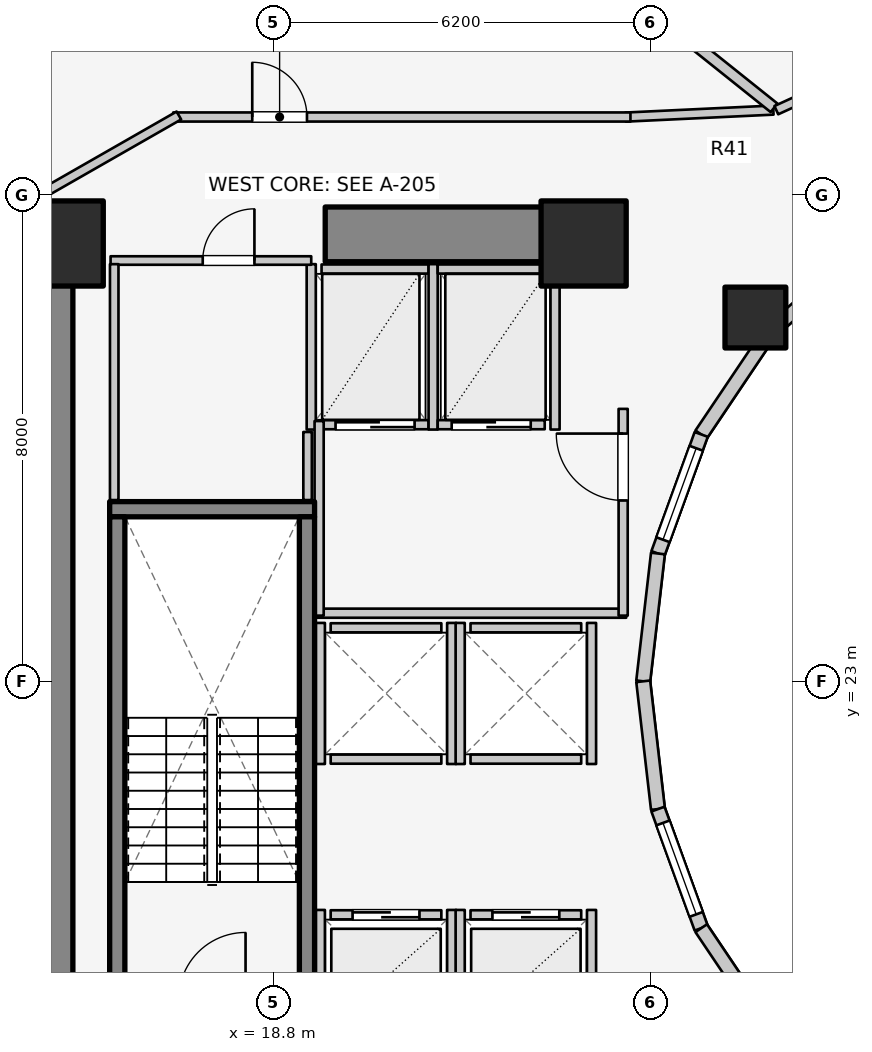
"""IFC4 building model, lengths in metres.
Left out: names, types, materials, properties, quantities, classifications, styles, units other than length and angle.
Written with IfcOpenShell. Run it as: python <this file> out.ifc"""

import sys

from ifc_helpers import new_model, si_unit, direction, frame, frame_2d, origin, origin_2d, place, context, subcontext, project, spatial, rectangle, extrude, element, fill, save


model = new_model("IFC4")
c1 = context("Model", 3, precision=1e-05, world=origin(), true_north=direction((0.0, 1.0)))
c2 = subcontext(c1, "Body", "Model", "MODEL_VIEW")
j1 = project(units=[si_unit("LENGTHUNIT", "METRE"), si_unit("PLANEANGLEUNIT", "RADIAN")], contexts=[c1])
p1 = place(None, origin())
s1 = spatial("IfcSite", under=j1, at=p1, CompositionType="ELEMENT")
p2 = place(p1, origin())
s2 = spatial("IfcBuilding", under=s1, at=p2, CompositionType="ELEMENT")
p3 = place(p2, frame((0.0, 0.0, 30.7)))
s3 = spatial("IfcBuildingStorey", under=s2, at=p3, CompositionType="ELEMENT", Elevation=30.7)
p4 = place(p3, frame((15.05, 17.05, 0.0), z_axis=(0.0, 0.0, 1.0), x_axis=(0.0, 1.0, 0.0)))
e1 = element("IfcWall", 1, at=p4, inside=s3, PredefinedType="SHEAR", context=c2, shape_type="SweptSolid", body=[
    extrude(rectangle(XDim=12.8, YDim=0.9, at=frame_2d((6.4, 0.0))), origin(), (0.0, 0.0, 1.0), 3.1),
])
p5 = place(p3, frame((19.65, 30.35, 0.0), z_axis=(0.0, 0.0, 1.0), x_axis=(1.0, 0.0, 0.0)))
e2 = element("IfcWall", 2, at=p5, inside=s3, PredefinedType="SHEAR", context=c2, shape_type="SweptSolid", body=[
    extrude(rectangle(XDim=4.5, YDim=0.9, at=frame_2d((2.25, 0.0))), origin(), (0.0, 0.0, 1.0), 3.1),
])
p6 = place(p3, frame((16.105, 25.83, 0.0), z_axis=(0.0, 0.0, 1.0), x_axis=(1.0, 0.0, 0.0)))
e3 = element("IfcWall", 3, at=p6, inside=s3, PredefinedType="SOLIDWALL", context=c2, shape_type="SweptSolid", body=[
    extrude(rectangle(XDim=3.37, YDim=0.25, at=frame_2d((1.685, 0.0))), origin(), (0.0, 0.0, 1.0), 3.1),
])
for number, where, z_axis, x_axis in (
    (4, (16.23, 17.895, 0.0), (0.0, 0.0, 1.0), (0.0, 1.0, 0.0)),
    (5, (19.35, 17.895, 0.0), (0.0, 0.0, 1.0), (0.0, 1.0, 0.0)),
):
    element("IfcWall", number, at=place(p3, frame(where, z_axis=z_axis, x_axis=x_axis)), inside=s3, PredefinedType="SOLIDWALL", context=c2, shape_type="SweptSolid", body=[
        extrude(rectangle(XDim=7.81, YDim=0.25, at=frame_2d((3.905, 0.0))), origin(), (0.0, 0.0, 1.0), 3.1),
    ])
for number, where, z_axis, x_axis in (
    (6, (23.9, 30.2, 0.0), (0.0, 0.0, 1.0), (1.0, 0.0, 0.0)),
    (7, (15.3, 30.2, 0.0), (0.0, 0.0, 1.0), (1.0, 0.0, 0.0)),
):
    element("IfcColumn", number, at=place(p3, frame(where, z_axis=z_axis, x_axis=x_axis)), inside=s3, PredefinedType="COLUMN", context=c2, shape_type="SweptSolid", body=[
        extrude(rectangle(XDim=1.4, YDim=1.4, at=origin_2d()), origin(), (0.0, 0.0, 1.0), 3.1),
    ])
p7 = place(p3, frame((26.725, 28.982, 0.0), z_axis=(0.0, 0.0, 1.0), x_axis=(1.0, 0.0, 0.0)))
e8 = element("IfcColumn", 8, at=p7, inside=s3, PredefinedType="COLUMN", context=c2, shape_type="SweptSolid", body=[
    extrude(rectangle(XDim=1.0, YDim=1.0, at=origin_2d()), origin(), (0.0, 0.0, 1.0), 3.1),
])
p8 = place(p3, frame((28.44, 30.032, 0.0), z_axis=(0.0, 0.0, 1.0), x_axis=(-0.752576694707, -0.658504607869, 0.0)))
e9 = element("IfcWall", 9, at=p8, inside=s3, PredefinedType="STANDARD", context=c2, shape_type="SweptSolid", body=[
    extrude(rectangle(XDim=1.959, YDim=0.23, at=frame_2d((0.98, 0.0))), origin(), (0.0, 0.0, 1.0), 2.16),
])
p9 = place(p3, frame((26.965, 28.742, 0.0), z_axis=(0.0, 0.0, 1.0), x_axis=(-0.558197800898, -0.829707909492, 0.0)))
e10 = element("IfcWall", 10, at=p9, inside=s3, PredefinedType="STANDARD", context=c2, shape_type="SweptSolid", body=[
    extrude(rectangle(XDim=2.027, YDim=0.23, at=frame_2d((1.013, 0.0))), origin(), (0.0, 0.0, 1.0), 2.16),
])
p10 = place(p3, frame((25.834, 27.06, 0.0), z_axis=(0.0, 0.0, 1.0), x_axis=(-0.341423187295, -0.93990968033, 0.0)))
e11 = element("IfcWall", 11, at=p10, inside=s3, PredefinedType="STANDARD", context=c2, shape_type="SweptSolid", body=[
    extrude(rectangle(XDim=2.084, YDim=0.23, at=frame_2d((1.042, 0.0))), origin(), (0.0, 0.0, 1.0), 2.84),
])
p11 = place(p10, frame((0.242, 0.0, 0.85)))
e12 = element("IfcOpeningElement", 12, at=p11, cuts=e11, PredefinedType="OPENING", context=c2, shape_type="SweptSolid", body=[
    extrude(rectangle(XDim=1.6, YDim=1.65, at=frame_2d((0.8, 0.825))), frame((0.0, 0.125, 0.0), z_axis=(0.0, -1.0, 0.0), x_axis=(1.0, 0.0, 0.0)), (0.0, 0.0, 1.0), 0.25),
])
for number, where, z_axis, x_axis in (
    (13, (25.123, 25.102, 0.0), (0.0, 0.0, 1.0), (-0.115, -0.993, 0.0)),
    (14, (24.88, 23.0, 0.0), (0.0, 0.0, 1.0), (0.115, -0.993, 0.0)),
):
    element("IfcWall", number, at=place(p3, frame(where, z_axis=z_axis, x_axis=x_axis)), inside=s3, PredefinedType="STANDARD", context=c2, shape_type="SweptSolid", body=[
        extrude(rectangle(XDim=2.115, YDim=0.23, at=frame_2d((1.058, 0.0))), origin(), (0.0, 0.0, 1.0), 2.84),
    ])
p12 = place(p3, frame((25.123, 20.898, 0.0), z_axis=(0.0, 0.0, 1.0), x_axis=(0.341423187295, -0.93990968033, 0.0)))
e15 = element("IfcWall", 15, at=p12, inside=s3, PredefinedType="STANDARD", context=c2, shape_type="SweptSolid", body=[
    extrude(rectangle(XDim=2.084, YDim=0.23, at=frame_2d((1.042, 0.0))), origin(), (0.0, 0.0, 1.0), 2.84),
])
p13 = place(p12, frame((0.242, 0.0, 0.85)))
e16 = element("IfcOpeningElement", 16, at=p13, cuts=e15, PredefinedType="OPENING", context=c2, shape_type="SweptSolid", body=[
    extrude(rectangle(XDim=1.6, YDim=1.65, at=frame_2d((0.8, 0.825))), frame((0.0, 0.125, 0.0), z_axis=(0.0, -1.0, 0.0), x_axis=(1.0, 0.0, 0.0)), (0.0, 0.0, 1.0), 0.25),
])
p14 = place(p3, frame((25.834, 18.94, 0.0), z_axis=(0.0, 0.0, 1.0), x_axis=(0.558197800898, -0.829707909492, 0.0)))
e17 = element("IfcWall", 17, at=p14, inside=s3, PredefinedType="STANDARD", context=c2, shape_type="SweptSolid", body=[
    extrude(rectangle(XDim=2.027, YDim=0.23, at=frame_2d((1.013, 0.0))), origin(), (0.0, 0.0, 1.0), 2.16),
])
p15 = place(p3, frame((19.74, 19.16, 0.0), z_axis=(0.0, 0.0, 1.0), x_axis=(1.0, 0.0, 0.0)))
e18 = element("IfcWall", 18, at=p15, inside=s3, PredefinedType="SOLIDWALL", context=c2, shape_type="SweptSolid", body=[
    extrude(rectangle(XDim=1.82, YDim=0.15, at=frame_2d((0.91, 0.0))), origin(), (0.0, 0.0, 1.0), 2.855),
])
p16 = place(p15, frame((0.36, 0.0, 0.0)))
e19 = element("IfcOpeningElement", 19, at=p16, cuts=e18, PredefinedType="OPENING", context=c2, shape_type="SweptSolid", body=[
    extrude(rectangle(XDim=1.1, YDim=2.1, at=frame_2d((0.55, 1.05))), frame((0.0, 0.085, 0.0), z_axis=(0.0, -1.0, 0.0), x_axis=(1.0, 0.0, 0.0)), (0.0, 0.0, 1.0), 0.17),
])
p17 = place(p3, frame((19.57, 17.02, 0.0), z_axis=(0.0, 0.0, 1.0), x_axis=(0.0, 1.0, 0.0)))
e20 = element("IfcWall", 20, at=p17, inside=s3, PredefinedType="SOLIDWALL", context=c2, shape_type="SweptSolid", body=[
    extrude(rectangle(XDim=2.22, YDim=0.15, at=frame_2d((1.11, 0.0))), origin(), (0.0, 0.0, 1.0), 2.12),
])
p18 = place(p3, frame((21.73, 17.02, 0.0), z_axis=(0.0, 0.0, 1.0), x_axis=(0.0, 1.0, 0.0)))
e21 = element("IfcWall", 21, at=p18, inside=s3, PredefinedType="SOLIDWALL", context=c2, shape_type="SweptSolid", body=[
    extrude(rectangle(XDim=2.22, YDim=0.15, at=frame_2d((1.11, 0.0))), origin(), (0.0, 0.0, 1.0), 2.855),
])
p19 = place(p3, frame((22.04, 19.16, 0.0), z_axis=(0.0, 0.0, 1.0), x_axis=(1.0, 0.0, 0.0)))
e22 = element("IfcWall", 22, at=p19, inside=s3, PredefinedType="SOLIDWALL", context=c2, shape_type="SweptSolid", body=[
    extrude(rectangle(XDim=1.82, YDim=0.15, at=frame_2d((0.91, 0.0))), origin(), (0.0, 0.0, 1.0), 2.12),
])
p20 = place(p19, frame((0.36, 0.0, 0.0)))
e23 = element("IfcOpeningElement", 23, at=p20, cuts=e22, PredefinedType="OPENING", context=c2, shape_type="SweptSolid", body=[
    extrude(rectangle(XDim=1.1, YDim=2.1, at=frame_2d((0.55, 1.05))), frame((0.0, 0.085, 0.0), z_axis=(0.0, -1.0, 0.0), x_axis=(1.0, 0.0, 0.0)), (0.0, 0.0, 1.0), 0.17),
])
p21 = place(p3, frame((21.87, 17.02, 0.0), z_axis=(0.0, 0.0, 1.0), x_axis=(0.0, 1.0, 0.0)))
e24 = element("IfcWall", 24, at=p21, inside=s3, PredefinedType="SOLIDWALL", context=c2, shape_type="SweptSolid", body=[
    extrude(rectangle(XDim=2.22, YDim=0.15, at=frame_2d((1.11, 0.0))), origin(), (0.0, 0.0, 1.0), 2.855),
])
p22 = place(p3, frame((24.03, 17.02, 0.0), z_axis=(0.0, 0.0, 1.0), x_axis=(0.0, 1.0, 0.0)))
e25 = element("IfcWall", 25, at=p22, inside=s3, PredefinedType="SOLIDWALL", context=c2, shape_type="SweptSolid", body=[
    extrude(rectangle(XDim=2.22, YDim=0.15, at=frame_2d((1.11, 0.0))), origin(), (0.0, 0.0, 1.0), 2.12),
])
for number, where, z_axis, x_axis in (
    (26, (19.74, 21.72, 0.0), (0.0, 0.0, 1.0), (1.0, 0.0, 0.0)),
    (27, (19.74, 23.88, 0.0), (0.0, 0.0, 1.0), (1.0, 0.0, 0.0)),
):
    element("IfcWall", number, at=place(p3, frame(where, z_axis=z_axis, x_axis=x_axis)), inside=s3, PredefinedType="SOLIDWALL", context=c2, shape_type="SweptSolid", body=[
        extrude(rectangle(XDim=1.82, YDim=0.15, at=frame_2d((0.91, 0.0))), origin(), (0.0, 0.0, 1.0), 2.855),
    ])
for number, where, z_axis, x_axis in (
    (28, (19.57, 21.64, 0.0), (0.0, 0.0, 1.0), (0.0, 1.0, 0.0)),
    (29, (21.73, 21.64, 0.0), (0.0, 0.0, 1.0), (0.0, 1.0, 0.0)),
):
    element("IfcWall", number, at=place(p3, frame(where, z_axis=z_axis, x_axis=x_axis)), inside=s3, PredefinedType="SOLIDWALL", context=c2, shape_type="SweptSolid", body=[
        extrude(rectangle(XDim=2.32, YDim=0.15, at=frame_2d((1.16, 0.0))), origin(), (0.0, 0.0, 1.0), 2.855),
    ])
for number, where, z_axis, x_axis in (
    (30, (22.04, 21.72, 0.0), (0.0, 0.0, 1.0), (1.0, 0.0, 0.0)),
    (31, (22.04, 23.88, 0.0), (0.0, 0.0, 1.0), (1.0, 0.0, 0.0)),
):
    element("IfcWall", number, at=place(p3, frame(where, z_axis=z_axis, x_axis=x_axis)), inside=s3, PredefinedType="SOLIDWALL", context=c2, shape_type="SweptSolid", body=[
        extrude(rectangle(XDim=1.82, YDim=0.15, at=frame_2d((0.91, 0.0))), origin(), (0.0, 0.0, 1.0), 2.12),
    ])
p23 = place(p3, frame((21.87, 21.64, 0.0), z_axis=(0.0, 0.0, 1.0), x_axis=(0.0, 1.0, 0.0)))
e32 = element("IfcWall", 32, at=p23, inside=s3, PredefinedType="SOLIDWALL", context=c2, shape_type="SweptSolid", body=[
    extrude(rectangle(XDim=2.32, YDim=0.15, at=frame_2d((1.16, 0.0))), origin(), (0.0, 0.0, 1.0), 2.855),
])
p24 = place(p3, frame((24.03, 21.64, 0.0), z_axis=(0.0, 0.0, 1.0), x_axis=(0.0, 1.0, 0.0)))
e33 = element("IfcWall", 33, at=p24, inside=s3, PredefinedType="SOLIDWALL", context=c2, shape_type="SweptSolid", body=[
    extrude(rectangle(XDim=2.32, YDim=0.15, at=frame_2d((1.16, 0.0))), origin(), (0.0, 0.0, 1.0), 2.12),
])
p25 = place(p3, frame((19.59, 27.22, 0.0), z_axis=(0.0, 0.0, 1.0), x_axis=(1.0, 0.0, 0.0)))
e34 = element("IfcWall", 34, at=p25, inside=s3, PredefinedType="SOLIDWALL", context=c2, shape_type="SweptSolid", body=[
    extrude(rectangle(XDim=1.76, YDim=0.15, at=frame_2d((0.88, 0.0))), origin(), (0.0, 0.0, 1.0), 2.855),
])
p26 = place(p25, frame((0.23, 0.0, 0.0)))
e35 = element("IfcOpeningElement", 35, at=p26, cuts=e34, PredefinedType="OPENING", context=c2, shape_type="SweptSolid", body=[
    extrude(rectangle(XDim=1.3, YDim=2.1, at=frame_2d((0.65, 1.05))), frame((0.0, 0.085, 0.0), z_axis=(0.0, -1.0, 0.0), x_axis=(1.0, 0.0, 0.0)), (0.0, 0.0, 1.0), 0.17),
])
p27 = place(p3, frame((19.59, 29.78, 0.0), z_axis=(0.0, 0.0, 1.0), x_axis=(1.0, 0.0, 0.0)))
e36 = element("IfcWall", 36, at=p27, inside=s3, PredefinedType="SOLIDWALL", context=c2, shape_type="SweptSolid", body=[
    extrude(rectangle(XDim=1.76, YDim=0.15, at=frame_2d((0.88, 0.0))), origin(), (0.0, 0.0, 1.0), 2.855),
])
for number, where, z_axis, x_axis in (
    (37, (19.42, 27.14, 0.0), (0.0, 0.0, 1.0), (0.0, 1.0, 0.0)),
    (38, (21.425, 27.14, 0.0), (0.0, 0.0, 1.0), (0.0, 1.0, 0.0)),
):
    element("IfcWall", number, at=place(p3, frame(where, z_axis=z_axis, x_axis=x_axis)), inside=s3, PredefinedType="SOLIDWALL", context=c2, shape_type="SweptSolid", body=[
        extrude(rectangle(XDim=2.72, YDim=0.15, at=frame_2d((1.36, 0.0))), origin(), (0.0, 0.0, 1.0), 2.855),
    ])
p28 = place(p3, frame((21.5, 27.22, 0.0), z_axis=(0.0, 0.0, 1.0), x_axis=(1.0, 0.0, 0.0)))
e39 = element("IfcWall", 39, at=p28, inside=s3, PredefinedType="SOLIDWALL", context=c2, shape_type="SweptSolid", body=[
    extrude(rectangle(XDim=1.76, YDim=0.15, at=frame_2d((0.88, 0.0))), origin(), (0.0, 0.0, 1.0), 2.855),
])
p29 = place(p28, frame((0.23, 0.0, 0.0)))
e40 = element("IfcOpeningElement", 40, at=p29, cuts=e39, PredefinedType="OPENING", context=c2, shape_type="SweptSolid", body=[
    extrude(rectangle(XDim=1.3, YDim=2.1, at=frame_2d((0.65, 1.05))), frame((0.0, 0.085, 0.0), z_axis=(0.0, -1.0, 0.0), x_axis=(1.0, 0.0, 0.0)), (0.0, 0.0, 1.0), 0.17),
])
p30 = place(p3, frame((21.5, 29.78, 0.0), z_axis=(0.0, 0.0, 1.0), x_axis=(1.0, 0.0, 0.0)))
e41 = element("IfcWall", 41, at=p30, inside=s3, PredefinedType="SOLIDWALL", context=c2, shape_type="SweptSolid", body=[
    extrude(rectangle(XDim=1.76, YDim=0.15, at=frame_2d((0.88, 0.0))), origin(), (0.0, 0.0, 1.0), 2.855),
])
p31 = place(p3, frame((23.43, 27.14, 0.0), z_axis=(0.0, 0.0, 1.0), x_axis=(0.0, 1.0, 0.0)))
e42 = element("IfcWall", 42, at=p31, inside=s3, PredefinedType="SOLIDWALL", context=c2, shape_type="SweptSolid", body=[
    extrude(rectangle(XDim=2.72, YDim=0.15, at=frame_2d((1.36, 0.0))), origin(), (0.0, 0.0, 1.0), 2.855),
])
p32 = place(p3, frame((19.52, 24.12, 0.0), z_axis=(0.0, 0.0, 1.0), x_axis=(1.0, 0.0, 0.0)))
e43 = element("IfcWall", 43, at=p32, inside=s3, PredefinedType="PARTITIONING", context=c2, shape_type="SweptSolid", body=[
    extrude(rectangle(XDim=5.08, YDim=0.15, at=frame_2d((2.54, 0.0))), origin(), (0.0, 0.0, 1.0), 2.12),
])
p33 = place(p3, frame((19.55, 24.08, 0.0), z_axis=(0.0, 0.0, 1.0), x_axis=(0.0, 1.0, 0.0)))
e44 = element("IfcWall", 44, at=p33, inside=s3, PredefinedType="PARTITIONING", context=c2, shape_type="SweptSolid", body=[
    extrude(rectangle(XDim=3.2, YDim=0.15, at=frame_2d((1.6, 0.0))), origin(), (0.0, 0.0, 1.0), 2.855),
])
p34 = place(p3, frame((24.55, 24.08, 0.0), z_axis=(0.0, 0.0, 1.0), x_axis=(0.0, 1.0, 0.0)))
e45 = element("IfcWall", 45, at=p34, inside=s3, PredefinedType="PARTITIONING", context=c2, shape_type="SweptSolid", body=[
    extrude(rectangle(XDim=3.4, YDim=0.15, at=frame_2d((1.7, 0.0))), origin(), (0.0, 0.0, 1.0), 2.855),
])
p35 = place(p34, frame((1.894, 0.0, 0.0)))
e46 = element("IfcOpeningElement", 46, at=p35, cuts=e45, PredefinedType="OPENING", context=c2, shape_type="SweptSolid", body=[
    extrude(rectangle(XDim=1.1, YDim=2.1, at=frame_2d((0.55, 1.05))), frame((0.0, 0.085, 0.0), z_axis=(0.0, -1.0, 0.0), x_axis=(1.0, 0.0, 0.0)), (0.0, 0.0, 1.0), 0.17),
])
p36 = place(p3, frame((16.12, 29.92, 0.0), z_axis=(0.0, 0.0, 1.0), x_axis=(1.0, 0.0, 0.0)))
e47 = element("IfcWall", 47, at=p36, inside=s3, PredefinedType="PLUMBINGWALL", context=c2, shape_type="SweptSolid", body=[
    extrude(rectangle(XDim=3.3, YDim=0.14, at=frame_2d((1.65, 0.0))), origin(), (0.0, 0.0, 1.0), 2.855),
])
p37 = place(p36, frame((1.516, 0.0, 0.0)))
e48 = element("IfcOpeningElement", 48, at=p37, cuts=e47, PredefinedType="OPENING", context=c2, shape_type="SweptSolid", body=[
    extrude(rectangle(XDim=0.85, YDim=2.05, at=frame_2d((0.425, 1.025))), frame((0.0, 0.08, 0.0), z_axis=(0.0, -1.0, 0.0), x_axis=(1.0, 0.0, 0.0)), (0.0, 0.0, 1.0), 0.16),
])
p38 = place(p3, frame((16.18, 25.98, 0.0), z_axis=(0.0, 0.0, 1.0), x_axis=(0.0, 1.0, 0.0)))
e49 = element("IfcWall", 49, at=p38, inside=s3, PredefinedType="PLUMBINGWALL", context=c2, shape_type="SweptSolid", body=[
    extrude(rectangle(XDim=3.88, YDim=0.14, at=frame_2d((1.94, 0.0))), origin(), (0.0, 0.0, 1.0), 2.855),
])
p39 = place(p3, frame((19.36, 25.98, 0.0), z_axis=(0.0, 0.0, 1.0), x_axis=(0.0, 1.0, 0.0)))
e50 = element("IfcWall", 50, at=p39, inside=s3, PredefinedType="PLUMBINGWALL", context=c2, shape_type="SweptSolid", body=[
    extrude(rectangle(XDim=1.12, YDim=0.14, at=frame_2d((0.56, 0.0))), origin(), (0.0, 0.0, 1.0), 2.855),
])
p40 = place(p3, frame((27.02, 32.394, 0.0), z_axis=(0.0, 0.0, 1.0), x_axis=(-0.998877427952, -0.047369651964, 0.0)))
e51 = element("IfcWall", 51, at=p40, inside=s3, PredefinedType="PARTITIONING", context=c2, shape_type="SweptSolid", body=[
    extrude(rectangle(XDim=2.433, YDim=0.15, at=frame_2d((1.216, 0.0))), origin(), (0.0, 0.0, 1.0), 2.237),
])
p41 = place(p3, frame((17.15, 32.28, 0.0), z_axis=(0.0, 0.0, 1.0), x_axis=(1.0, 0.0, 0.0)))
e52 = element("IfcWall", 52, at=p41, inside=s3, PredefinedType="PARTITIONING", context=c2, shape_type="SweptSolid", body=[
    extrude(rectangle(XDim=7.52, YDim=0.15, at=frame_2d((3.76, 0.0))), origin(), (0.0, 0.0, 1.0), 2.237),
])
p42 = place(p41, frame((1.3, 0.0, 0.0)))
e53 = element("IfcOpeningElement", 53, at=p42, cuts=e52, PredefinedType="OPENING", context=c2, shape_type="SweptSolid", body=[
    extrude(rectangle(XDim=0.9, YDim=2.1, at=frame_2d((0.45, 1.05))), frame((0.0, 0.085, 0.0), z_axis=(0.0, -1.0, 0.0), x_axis=(1.0, 0.0, 0.0)), (0.0, 0.0, 1.0), 0.17),
])
p43 = place(p3, frame((17.243, 32.305, 0.0), z_axis=(0.0, 0.0, 1.0), x_axis=(-0.867991349648, -0.496579315857, 0.0)))
e54 = element("IfcWall", 54, at=p43, inside=s3, PredefinedType="PARTITIONING", context=c2, shape_type="SweptSolid", body=[
    extrude(rectangle(XDim=2.567, YDim=0.15, at=frame_2d((1.283, 0.0))), origin(), (0.0, 0.0, 1.0), 2.069),
])
p44 = place(p3, frame((27.032, 32.431, 0.0), z_axis=(0.0, 0.0, 1.0), x_axis=(-0.781055486744, 0.624461629428, 0.0)))
e55 = element("IfcWall", 55, at=p44, inside=s3, PredefinedType="PARTITIONING", context=c2, shape_type="SweptSolid", body=[
    extrude(rectangle(XDim=10.843, YDim=0.18, at=frame_2d((5.422, 0.0))), origin(), (0.0, 0.0, 1.0), 2.237),
])
p45 = place(p3, frame((29.457, 33.482, 0.0), z_axis=(0.0, 0.0, 1.0), x_axis=(-0.909747571199, -0.415161843982, 0.0)))
e56 = element("IfcWall", 56, at=p45, inside=s3, PredefinedType="PARTITIONING", context=c2, shape_type="SweptSolid", body=[
    extrude(rectangle(XDim=2.625, YDim=0.15, at=frame_2d((1.312, 0.0))), origin(), (0.0, 0.0, 1.0), 2.237),
])
p46 = place(p45, frame((0.838, 0.0, 0.0)))
e57 = element("IfcOpeningElement", 57, at=p46, cuts=e56, PredefinedType="OPENING", context=c2, shape_type="SweptSolid", body=[
    extrude(rectangle(XDim=0.95, YDim=2.1, at=frame_2d((0.475, 1.05))), frame((0.0, 0.085, 0.0), z_axis=(0.0, -1.0, 0.0), x_axis=(1.0, 0.0, 0.0)), (0.0, 0.0, 1.0), 0.17),
])
p47 = place(p11, origin())
e58 = element("IfcWindow", 58, at=p47, inside=s3, PartitioningType="SINGLE_PANEL", PredefinedType="WINDOW", context=c2, shape_type="SweptSolid", body=[
    extrude(rectangle(XDim=1.6, YDim=1.65, at=frame_2d((0.8, 0.825))), frame((0.0, 0.03, 0.0), z_axis=(0.0, -1.0, 0.0), x_axis=(1.0, 0.0, 0.0)), (0.0, 0.0, 1.0), 0.06),
])
fill(e12, e58)
p48 = place(p13, origin())
e59 = element("IfcWindow", 59, at=p48, inside=s3, PartitioningType="SINGLE_PANEL", PredefinedType="WINDOW", context=c2, shape_type="SweptSolid", body=[
    extrude(rectangle(XDim=1.6, YDim=1.65, at=frame_2d((0.8, 0.825))), frame((0.0, 0.03, 0.0), z_axis=(0.0, -1.0, 0.0), x_axis=(1.0, 0.0, 0.0)), (0.0, 0.0, 1.0), 0.06),
])
fill(e16, e59)
p49 = place(p16, origin())
e60 = element("IfcDoor", 60, at=p49, inside=s3, OperationType="DOUBLE_DOOR_SLIDING", PredefinedType="DOOR", context=c2, shape_type="SweptSolid", body=[
    extrude(rectangle(XDim=1.1, YDim=2.1, at=frame_2d((0.55, 1.05))), frame((0.0, 0.025, 0.0), z_axis=(0.0, -1.0, 0.0), x_axis=(1.0, 0.0, 0.0)), (0.0, 0.0, 1.0), 0.05),
])
fill(e19, e60)
p50 = place(p20, origin())
e61 = element("IfcDoor", 61, at=p50, inside=s3, OperationType="DOUBLE_DOOR_SLIDING", PredefinedType="DOOR", context=c2, shape_type="SweptSolid", body=[
    extrude(rectangle(XDim=1.1, YDim=2.1, at=frame_2d((0.55, 1.05))), frame((0.0, 0.025, 0.0), z_axis=(0.0, -1.0, 0.0), x_axis=(1.0, 0.0, 0.0)), (0.0, 0.0, 1.0), 0.05),
])
fill(e23, e61)
p51 = place(p26, origin())
e62 = element("IfcDoor", 62, at=p51, inside=s3, OperationType="DOUBLE_DOOR_SLIDING", PredefinedType="DOOR", context=c2, shape_type="SweptSolid", body=[
    extrude(rectangle(XDim=1.3, YDim=2.1, at=frame_2d((0.65, 1.05))), frame((0.0, 0.025, 0.0), z_axis=(0.0, -1.0, 0.0), x_axis=(1.0, 0.0, 0.0)), (0.0, 0.0, 1.0), 0.05),
])
fill(e35, e62)
p52 = place(p29, origin())
e63 = element("IfcDoor", 63, at=p52, inside=s3, OperationType="DOUBLE_DOOR_SLIDING", PredefinedType="DOOR", context=c2, shape_type="SweptSolid", body=[
    extrude(rectangle(XDim=1.3, YDim=2.1, at=frame_2d((0.65, 1.05))), frame((0.0, 0.025, 0.0), z_axis=(0.0, -1.0, 0.0), x_axis=(1.0, 0.0, 0.0)), (0.0, 0.0, 1.0), 0.05),
])
fill(e40, e63)
p53 = place(p35, origin())
e64 = element("IfcDoor", 64, at=p53, inside=s3, OperationType="SINGLE_SWING_RIGHT", PredefinedType="DOOR", context=c2, shape_type="SweptSolid", body=[
    extrude(rectangle(XDim=1.1, YDim=2.1, at=frame_2d((0.55, 1.05))), frame((0.0, 0.025, 0.0), z_axis=(0.0, -1.0, 0.0), x_axis=(1.0, 0.0, 0.0)), (0.0, 0.0, 1.0), 0.05),
])
fill(e46, e64)
p54 = place(p37, origin())
e65 = element("IfcDoor", 65, at=p54, inside=s3, OperationType="SINGLE_SWING_RIGHT", PredefinedType="DOOR", context=c2, shape_type="SweptSolid", body=[
    extrude(rectangle(XDim=0.85, YDim=2.05, at=frame_2d((0.425, 1.025))), frame((0.0, 0.025, 0.0), z_axis=(0.0, -1.0, 0.0), x_axis=(1.0, 0.0, 0.0)), (0.0, 0.0, 1.0), 0.05),
])
fill(e48, e65)
p55 = place(p42, origin())
e66 = element("IfcDoor", 66, at=p55, inside=s3, OperationType="SINGLE_SWING_LEFT", PredefinedType="DOOR", context=c2, shape_type="SweptSolid", body=[
    extrude(rectangle(XDim=0.9, YDim=2.1, at=frame_2d((0.45, 1.05))), frame((0.0, 0.025, 0.0), z_axis=(0.0, -1.0, 0.0), x_axis=(1.0, 0.0, 0.0)), (0.0, 0.0, 1.0), 0.05),
])
fill(e53, e66)
save(model, sys.argv[1])
